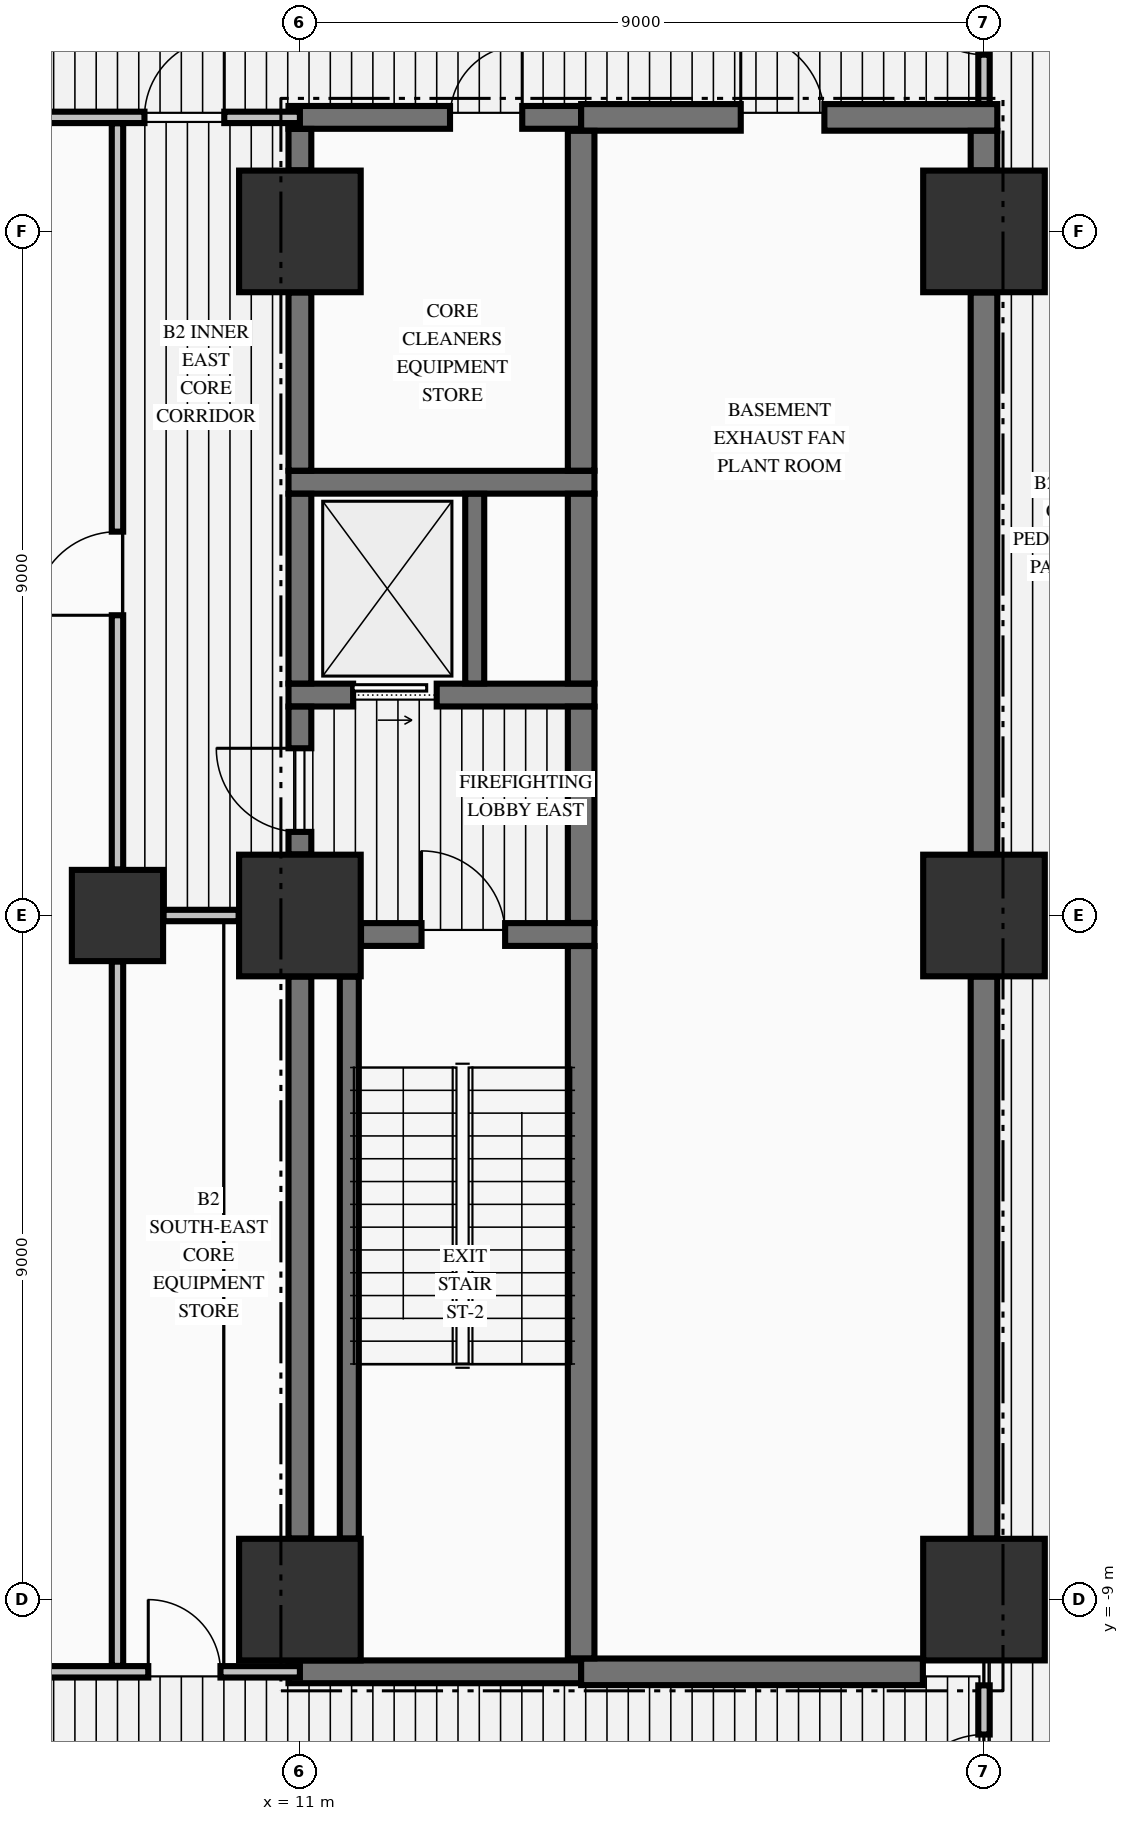
"""IFC4 building model, lengths in metres.
Left out: names, types, materials, properties, quantities, classifications, styles, units other than length and angle.
Written with IfcOpenShell. Run it as: python <this file> out.ifc"""

import sys

from ifc_helpers import new_model, si_unit, direction, frame, frame_2d, origin, origin_2d, place, context, subcontext, project, spatial, rectangle, extrude, element, fill, save


model = new_model("IFC4")
c1 = context("Model", 3, precision=1e-05, world=origin(), true_north=direction((0.0, 1.0)))
c2 = subcontext(c1, "Body", "Model", "MODEL_VIEW")
j1 = project(units=[si_unit("LENGTHUNIT", "METRE"), si_unit("PLANEANGLEUNIT", "RADIAN")], contexts=[c1])
p1 = place(None, origin())
s1 = spatial("IfcSite", under=j1, at=p1, CompositionType="ELEMENT")
p2 = place(p1, origin())
s2 = spatial("IfcBuilding", under=s1, at=p2, CompositionType="ELEMENT")
p3 = place(p2, frame((0.0, 0.0, -9.1)))
s3 = spatial("IfcBuildingStorey", under=s2, at=p3, CompositionType="ELEMENT", Elevation=-9.1)
for number, where, z_axis, x_axis in (
    (1, (11.0, -9.0, -0.45), (0.0, 0.0, 1.0), (1.0, 0.0, 0.0)),
    (2, (11.0, 0.0, -0.45), (0.0, 0.0, 1.0), (1.0, 0.0, 0.0)),
    (3, (11.0, 9.0, -0.45), (0.0, 0.0, 1.0), (1.0, 0.0, 0.0)),
    (4, (20.0, -9.0, -0.45), (0.0, 0.0, 1.0), (1.0, 0.0, 0.0)),
    (5, (20.0, 0.0, -0.45), (0.0, 0.0, 1.0), (1.0, 0.0, 0.0)),
    (6, (20.0, 9.0, -0.45), (0.0, 0.0, 1.0), (1.0, 0.0, 0.0)),
):
    element("IfcColumn", number, at=place(p3, frame(where, z_axis=z_axis, x_axis=x_axis)), inside=s3, PredefinedType="COLUMN", context=c2, shape_type="SweptSolid", body=[
        extrude(rectangle(XDim=1.6, YDim=1.6, at=origin_2d()), origin(), (0.0, 0.0, 1.0), 4.65),
    ])
p4 = place(p3, frame((8.6, 0.0, -0.45), z_axis=(0.0, 0.0, 1.0), x_axis=(1.0, 0.0, 0.0)))
e7 = element("IfcColumn", 7, at=p4, inside=s3, PredefinedType="COLUMN", context=c2, shape_type="SweptSolid", body=[
    extrude(rectangle(XDim=1.2, YDim=1.2, at=origin_2d()), origin(), (0.0, 0.0, 1.0), 4.65),
])
p5 = place(p3, frame((10.85, -9.95, 0.0), z_axis=(0.0, 0.0, 1.0), x_axis=(1.0, 0.0, 0.0)))
e8 = element("IfcWall", 8, at=p5, inside=s3, PredefinedType="SHEAR", context=c2, shape_type="SweptSolid", body=[
    extrude(rectangle(XDim=3.85, YDim=0.3, at=frame_2d((1.925, 0.0))), origin(), (0.0, 0.0, 1.0), 4.2),
])
p6 = place(p3, frame((14.7, -9.95, 0.0), z_axis=(0.0, 0.0, 1.0), x_axis=(1.0, 0.0, 0.0)))
e9 = element("IfcWall", 9, at=p6, inside=s3, PredefinedType="SHEAR", context=c2, shape_type="SweptSolid", body=[
    extrude(rectangle(XDim=4.496, YDim=0.35, at=frame_2d((2.248, 0.0))), origin(), (0.0, 0.0, 1.0), 4.2),
])
p7 = place(p3, frame((11.804, -0.25, 0.0), z_axis=(0.0, 0.0, 1.0), x_axis=(1.0, 0.0, 0.0)))
e10 = element("IfcWall", 10, at=p7, inside=s3, PredefinedType="SHEAR", context=c2, shape_type="SweptSolid", body=[
    extrude(rectangle(XDim=3.071, YDim=0.3, at=frame_2d((1.536, 0.0))), origin(), (0.0, 0.0, 1.0), 4.2),
])
p8 = place(p7, frame((0.796, 0.0, 0.0)))
e11 = element("IfcOpeningElement", 11, at=p8, cuts=e10, PredefinedType="OPENING", context=c2, shape_type="SweptSolid", body=[
    extrude(rectangle(XDim=1.1, YDim=2.15, at=frame_2d((0.55, 1.075))), frame((0.0, 0.16, 0.0), z_axis=(0.0, -1.0, 0.0), x_axis=(1.0, 0.0, 0.0)), (0.0, 0.0, 1.0), 0.32),
])
p9 = place(p3, frame((10.85, 2.9, 0.0), z_axis=(0.0, 0.0, 1.0), x_axis=(1.0, 0.0, 0.0)))
e12 = element("IfcWall", 12, at=p9, inside=s3, PredefinedType="SHEAR", context=c2, shape_type="SweptSolid", body=[
    extrude(rectangle(XDim=4.025, YDim=0.3, at=frame_2d((2.012, 0.0))), origin(), (0.0, 0.0, 1.0), 4.2),
])
p10 = place(p9, frame((0.85, 0.0, 0.0)))
e13 = element("IfcOpeningElement", 13, at=p10, cuts=e12, PredefinedType="OPENING", context=c2, shape_type="SweptSolid", body=[
    extrude(rectangle(XDim=1.1, YDim=2.2, at=frame_2d((0.55, 1.1))), frame((0.0, 0.16, 0.0), z_axis=(0.0, -1.0, 0.0), x_axis=(1.0, 0.0, 0.0)), (0.0, 0.0, 1.0), 0.32),
])
p11 = place(p3, frame((10.85, 5.7, 0.0), z_axis=(0.0, 0.0, 1.0), x_axis=(1.0, 0.0, 0.0)))
e14 = element("IfcWall", 14, at=p11, inside=s3, PredefinedType="SHEAR", context=c2, shape_type="SweptSolid", body=[
    extrude(rectangle(XDim=4.025, YDim=0.3, at=frame_2d((2.012, 0.0))), origin(), (0.0, 0.0, 1.0), 4.2),
])
p12 = place(p3, frame((10.85, 10.5, 0.0), z_axis=(0.0, 0.0, 1.0), x_axis=(1.0, 0.0, 0.0)))
e15 = element("IfcWall", 15, at=p12, inside=s3, PredefinedType="SHEAR", context=c2, shape_type="SweptSolid", body=[
    extrude(rectangle(XDim=3.85, YDim=0.3, at=frame_2d((1.925, 0.0))), origin(), (0.0, 0.0, 1.0), 4.2),
])
p13 = place(p12, frame((2.125, 0.0, 0.0)))
e16 = element("IfcOpeningElement", 16, at=p13, cuts=e15, PredefinedType="OPENING", context=c2, shape_type="SweptSolid", body=[
    extrude(rectangle(XDim=0.95, YDim=2.15, at=frame_2d((0.475, 1.075))), frame((0.0, 0.16, 0.0), z_axis=(0.0, -1.0, 0.0), x_axis=(1.0, 0.0, 0.0)), (0.0, 0.0, 1.0), 0.32),
])
p14 = place(p3, frame((14.7, 10.5, 0.0), z_axis=(0.0, 0.0, 1.0), x_axis=(1.0, 0.0, 0.0)))
e17 = element("IfcWall", 17, at=p14, inside=s3, PredefinedType="SHEAR", context=c2, shape_type="SweptSolid", body=[
    extrude(rectangle(XDim=5.475, YDim=0.35, at=frame_2d((2.738, 0.0))), origin(), (0.0, 0.0, 1.0), 4.2),
])
p15 = place(p14, frame((2.1, 0.0, 0.0)))
e18 = element("IfcOpeningElement", 18, at=p15, cuts=e17, PredefinedType="OPENING", context=c2, shape_type="SweptSolid", body=[
    extrude(rectangle(XDim=1.1, YDim=2.15, at=frame_2d((0.55, 1.075))), frame((0.0, 0.185, 0.0), z_axis=(0.0, -1.0, 0.0), x_axis=(1.0, 0.0, 0.0)), (0.0, 0.0, 1.0), 0.37),
])
p16 = place(p3, frame((-11.0, -9.95, 0.0), z_axis=(0.0, 0.0, 1.0), x_axis=(1.0, 0.0, 0.0)))
e19 = element("IfcWall", 19, at=p16, inside=s3, PredefinedType="PARTITIONING", context=c2, shape_type="SweptSolid", body=[
    extrude(rectangle(XDim=22.0, YDim=0.15, at=frame_2d((11.0, 0.0))), origin(), (0.0, 0.0, 1.0), 4.2),
])
p17 = place(p16, frame((1.045, 0.0, 0.0)))
e20 = element("IfcOpeningElement", 20, at=p17, cuts=e19, PredefinedType="OPENING", context=c2, shape_type="SweptSolid", body=[
    extrude(rectangle(XDim=0.95, YDim=2.15, at=frame_2d((0.475, 1.075))), frame((0.0, 0.085, 0.0), z_axis=(0.0, -1.0, 0.0), x_axis=(1.0, 0.0, 0.0)), (0.0, 0.0, 1.0), 0.17),
])
p18 = place(p16, frame((20.005, 0.0, 0.0)))
e21 = element("IfcOpeningElement", 21, at=p18, cuts=e19, PredefinedType="OPENING", context=c2, shape_type="SweptSolid", body=[
    extrude(rectangle(XDim=0.95, YDim=2.15, at=frame_2d((0.475, 1.075))), frame((0.0, 0.085, 0.0), z_axis=(0.0, -1.0, 0.0), x_axis=(1.0, 0.0, 0.0)), (0.0, 0.0, 1.0), 0.17),
])
p19 = place(p3, frame((9.206, 0.0, 0.0), z_axis=(0.0, 0.0, 1.0), x_axis=(1.0, 0.0, 0.0)))
e22 = element("IfcWall", 22, at=p19, inside=s3, PredefinedType="PARTITIONING", context=c2, shape_type="SweptSolid", body=[
    extrude(rectangle(XDim=0.988, YDim=0.15, at=frame_2d((0.494, 0.0))), origin(), (0.0, 0.0, 1.0), 3.242),
])
p20 = place(p3, frame((-11.0, 10.5, 0.0), z_axis=(0.0, 0.0, 1.0), x_axis=(1.0, 0.0, 0.0)))
e23 = element("IfcWall", 23, at=p20, inside=s3, PredefinedType="PARTITIONING", context=c2, shape_type="SweptSolid", body=[
    extrude(rectangle(XDim=22.0, YDim=0.15, at=frame_2d((11.0, 0.0))), origin(), (0.0, 0.0, 1.0), 4.2),
])
p21 = place(p20, frame((0.995, 0.0, 0.0)))
e24 = element("IfcOpeningElement", 24, at=p21, cuts=e23, PredefinedType="OPENING", context=c2, shape_type="SweptSolid", body=[
    extrude(rectangle(XDim=1.05, YDim=2.15, at=frame_2d((0.525, 1.075))), frame((0.0, 0.085, 0.0), z_axis=(0.0, -1.0, 0.0), x_axis=(1.0, 0.0, 0.0)), (0.0, 0.0, 1.0), 0.17),
])
p22 = place(p20, frame((19.955, 0.0, 0.0)))
e25 = element("IfcOpeningElement", 25, at=p22, cuts=e23, PredefinedType="OPENING", context=c2, shape_type="SweptSolid", body=[
    extrude(rectangle(XDim=1.05, YDim=2.15, at=frame_2d((0.525, 1.075))), frame((0.0, 0.085, 0.0), z_axis=(0.0, -1.0, 0.0), x_axis=(1.0, 0.0, 0.0)), (0.0, 0.0, 1.0), 0.17),
])
p23 = place(p3, frame((11.0, -8.196, 0.0), z_axis=(0.0, 0.0, 1.0), x_axis=(0.0, 1.0, 0.0)))
e26 = element("IfcWall", 26, at=p23, inside=s3, PredefinedType="SHEAR", context=c2, shape_type="SweptSolid", body=[
    extrude(rectangle(XDim=7.392, YDim=0.3, at=frame_2d((3.696, 0.0))), origin(), (0.0, 0.0, 1.0), 4.2),
])
p24 = place(p3, frame((11.0, 0.804, 0.0), z_axis=(0.0, 0.0, 1.0), x_axis=(0.0, 1.0, 0.0)))
e27 = element("IfcWall", 27, at=p24, inside=s3, PredefinedType="SHEAR", context=c2, shape_type="SweptSolid", body=[
    extrude(rectangle(XDim=1.944, YDim=0.3, at=frame_2d((0.972, 0.0))), origin(), (0.0, 0.0, 1.0), 4.2),
])
p25 = place(p24, frame((0.296, 0.0, 0.0)))
e28 = element("IfcOpeningElement", 28, at=p25, cuts=e27, PredefinedType="OPENING", context=c2, shape_type="SweptSolid", body=[
    extrude(rectangle(XDim=1.1, YDim=2.15, at=frame_2d((0.55, 1.075))), frame((0.0, 0.16, 0.0), z_axis=(0.0, -1.0, 0.0), x_axis=(1.0, 0.0, 0.0)), (0.0, 0.0, 1.0), 0.32),
])
p26 = place(p3, frame((11.0, 3.052, 0.0), z_axis=(0.0, 0.0, 1.0), x_axis=(0.0, 1.0, 0.0)))
e29 = element("IfcWall", 29, at=p26, inside=s3, PredefinedType="SHEAR", context=c2, shape_type="SweptSolid", body=[
    extrude(rectangle(XDim=2.496, YDim=0.3, at=frame_2d((1.248, 0.0))), origin(), (0.0, 0.0, 1.0), 4.2),
])
p27 = place(p3, frame((11.0, 5.852, 0.0), z_axis=(0.0, 0.0, 1.0), x_axis=(0.0, 1.0, 0.0)))
e30 = element("IfcWall", 30, at=p27, inside=s3, PredefinedType="SHEAR", context=c2, shape_type="SweptSolid", body=[
    extrude(rectangle(XDim=2.344, YDim=0.3, at=frame_2d((1.172, 0.0))), origin(), (0.0, 0.0, 1.0), 4.2),
])
p28 = place(p3, frame((11.0, 9.804, 0.0), z_axis=(0.0, 0.0, 1.0), x_axis=(0.0, 1.0, 0.0)))
e31 = element("IfcWall", 31, at=p28, inside=s3, PredefinedType="SHEAR", context=c2, shape_type="SweptSolid", body=[
    extrude(rectangle(XDim=0.544, YDim=0.3, at=frame_2d((0.272, 0.0))), origin(), (0.0, 0.0, 1.0), 4.2),
])
p29 = place(p3, frame((11.65, -8.196, 0.0), z_axis=(0.0, 0.0, 1.0), x_axis=(0.0, 1.0, 0.0)))
e32 = element("IfcWall", 32, at=p29, inside=s3, PredefinedType="SOLIDWALL", context=c2, shape_type="SweptSolid", body=[
    extrude(rectangle(XDim=7.392, YDim=0.25, at=frame_2d((3.696, 0.0))), origin(), (0.0, 0.0, 1.0), 4.2),
])
p30 = place(p3, frame((13.3, 3.052, 0.0), z_axis=(0.0, 0.0, 1.0), x_axis=(0.0, 1.0, 0.0)))
e33 = element("IfcWall", 33, at=p30, inside=s3, PredefinedType="SOLIDWALL", context=c2, shape_type="SweptSolid", body=[
    extrude(rectangle(XDim=2.496, YDim=0.25, at=frame_2d((1.248, 0.0))), origin(), (0.0, 0.0, 1.0), 4.2),
])
p31 = place(p3, frame((14.7, -9.773, 0.0), z_axis=(0.0, 0.0, 1.0), x_axis=(0.0, 1.0, 0.0)))
e34 = element("IfcWall", 34, at=p31, inside=s3, PredefinedType="SHEAR", context=c2, shape_type="SweptSolid", body=[
    extrude(rectangle(XDim=9.371, YDim=0.35, at=frame_2d((4.686, 0.0))), origin(), (0.0, 0.0, 1.0), 4.2),
])
p32 = place(p3, frame((14.7, -0.098, 0.0), z_axis=(0.0, 0.0, 1.0), x_axis=(0.0, 1.0, 0.0)))
e35 = element("IfcWall", 35, at=p32, inside=s3, PredefinedType="SHEAR", context=c2, shape_type="SweptSolid", body=[
    extrude(rectangle(XDim=2.846, YDim=0.35, at=frame_2d((1.423, 0.0))), origin(), (0.0, 0.0, 1.0), 4.2),
])
p33 = place(p3, frame((14.7, 3.052, 0.0), z_axis=(0.0, 0.0, 1.0), x_axis=(0.0, 1.0, 0.0)))
e36 = element("IfcWall", 36, at=p33, inside=s3, PredefinedType="SHEAR", context=c2, shape_type="SweptSolid", body=[
    extrude(rectangle(XDim=2.496, YDim=0.35, at=frame_2d((1.248, 0.0))), origin(), (0.0, 0.0, 1.0), 4.2),
])
p34 = place(p3, frame((14.7, 5.852, 0.0), z_axis=(0.0, 0.0, 1.0), x_axis=(0.0, 1.0, 0.0)))
e37 = element("IfcWall", 37, at=p34, inside=s3, PredefinedType="SHEAR", context=c2, shape_type="SweptSolid", body=[
    extrude(rectangle(XDim=4.471, YDim=0.35, at=frame_2d((2.235, 0.0))), origin(), (0.0, 0.0, 1.0), 4.2),
])
for number, where, z_axis, x_axis in (
    (38, (20.0, -8.196, 0.0), (0.0, 0.0, 1.0), (0.0, 1.0, 0.0)),
    (39, (20.0, 0.804, 0.0), (0.0, 0.0, 1.0), (0.0, 1.0, 0.0)),
):
    element("IfcWall", number, at=place(p3, frame(where, z_axis=z_axis, x_axis=x_axis)), inside=s3, PredefinedType="SHEAR", context=c2, shape_type="SweptSolid", body=[
        extrude(rectangle(XDim=7.392, YDim=0.35, at=frame_2d((3.696, 0.0))), origin(), (0.0, 0.0, 1.0), 4.2),
    ])
p35 = place(p3, frame((20.0, 9.804, 0.0), z_axis=(0.0, 0.0, 1.0), x_axis=(0.0, 1.0, 0.0)))
e40 = element("IfcWall", 40, at=p35, inside=s3, PredefinedType="SHEAR", context=c2, shape_type="SweptSolid", body=[
    extrude(rectangle(XDim=0.519, YDim=0.35, at=frame_2d((0.26, 0.0))), origin(), (0.0, 0.0, 1.0), 4.2),
])
p36 = place(p3, frame((8.6, -9.872, 0.0), z_axis=(0.0, 0.0, 1.0), x_axis=(0.0, 1.0, 0.0)))
e41 = element("IfcWall", 41, at=p36, inside=s3, PredefinedType="PARTITIONING", context=c2, shape_type="SweptSolid", body=[
    extrude(rectangle(XDim=9.266, YDim=0.15, at=frame_2d((4.633, 0.0))), origin(), (0.0, 0.0, 1.0), 4.2),
])
p37 = place(p3, frame((8.6, 0.606, 0.0), z_axis=(0.0, 0.0, 1.0), x_axis=(0.0, 1.0, 0.0)))
e42 = element("IfcWall", 42, at=p37, inside=s3, PredefinedType="PARTITIONING", context=c2, shape_type="SweptSolid", body=[
    extrude(rectangle(XDim=9.816, YDim=0.15, at=frame_2d((4.908, 0.0))), origin(), (0.0, 0.0, 1.0), 3.242),
])
p38 = place(p37, frame((3.344, 0.0, 0.0)))
e43 = element("IfcOpeningElement", 43, at=p38, cuts=e42, PredefinedType="OPENING", context=c2, shape_type="SweptSolid", body=[
    extrude(rectangle(XDim=1.1, YDim=2.15, at=frame_2d((0.55, 1.075))), frame((0.0, 0.085, 0.0), z_axis=(0.0, -1.0, 0.0), x_axis=(1.0, 0.0, 0.0)), (0.0, 0.0, 1.0), 0.17),
])
p39 = place(p3, frame((20.0, -12.522, 0.0), z_axis=(0.0, 0.0, 1.0), x_axis=(0.0, 1.0, 0.0)))
e44 = element("IfcWall", 44, at=p39, inside=s3, PredefinedType="PARTITIONING", context=c2, shape_type="SweptSolid", body=[
    extrude(rectangle(XDim=2.394, YDim=0.15, at=frame_2d((1.197, 0.0))), origin(), (0.0, 0.0, 1.0), 3.242),
])
p40 = place(p39, frame((0.697, 0.0, 0.0)))
e45 = element("IfcOpeningElement", 45, at=p40, cuts=e44, PredefinedType="OPENING", context=c2, shape_type="SweptSolid", body=[
    extrude(rectangle(XDim=1.05, YDim=2.15, at=frame_2d((0.525, 1.075))), frame((0.0, 0.085, 0.0), z_axis=(0.0, -1.0, 0.0), x_axis=(1.0, 0.0, 0.0)), (0.0, 0.0, 1.0), 0.17),
])
p41 = place(p3, frame((20.0, 10.678, 0.0), z_axis=(0.0, 0.0, 1.0), x_axis=(0.0, 1.0, 0.0)))
e46 = element("IfcWall", 46, at=p41, inside=s3, PredefinedType="PARTITIONING", context=c2, shape_type="SweptSolid", body=[
    extrude(rectangle(XDim=2.444, YDim=0.15, at=frame_2d((1.222, 0.0))), origin(), (0.0, 0.0, 1.0), 3.242),
])
p42 = place(p41, frame((0.647, 0.0, 0.0)))
e47 = element("IfcOpeningElement", 47, at=p42, cuts=e46, PredefinedType="OPENING", context=c2, shape_type="SweptSolid", body=[
    extrude(rectangle(XDim=1.05, YDim=2.15, at=frame_2d((0.525, 1.075))), frame((0.0, 0.085, 0.0), z_axis=(0.0, -1.0, 0.0), x_axis=(1.0, 0.0, 0.0)), (0.0, 0.0, 1.0), 0.17),
])
p43 = place(p8, origin())
e48 = element("IfcDoor", 48, at=p43, inside=s3, OperationType="SINGLE_SWING_LEFT", PredefinedType="DOOR", context=c2, shape_type="SweptSolid", body=[
    extrude(rectangle(XDim=1.1, YDim=2.15, at=frame_2d((0.55, 1.075))), frame((0.0, 0.025, 0.0), z_axis=(0.0, -1.0, 0.0), x_axis=(1.0, 0.0, 0.0)), (0.0, 0.0, 1.0), 0.05),
])
fill(e11, e48)
p44 = place(p25, origin())
e49 = element("IfcDoor", 49, at=p44, inside=s3, OperationType="SINGLE_SWING_RIGHT", PredefinedType="DOOR", context=c2, shape_type="SweptSolid", body=[
    extrude(rectangle(XDim=1.1, YDim=2.15, at=frame_2d((0.55, 1.075))), frame((0.0, 0.025, 0.0), z_axis=(0.0, -1.0, 0.0), x_axis=(1.0, 0.0, 0.0)), (0.0, 0.0, 1.0), 0.05),
])
fill(e28, e49)
p45 = place(p10, origin())
e50 = element("IfcDoor", 50, at=p45, inside=s3, OperationType="SLIDING_TO_RIGHT", PredefinedType="DOOR", context=c2, shape_type="SweptSolid", body=[
    extrude(rectangle(XDim=1.1, YDim=2.2, at=frame_2d((0.55, 1.1))), frame((0.0, 0.025, 0.0), z_axis=(0.0, -1.0, 0.0), x_axis=(1.0, 0.0, 0.0)), (0.0, 0.0, 1.0), 0.05),
])
fill(e13, e50)
p46 = place(p13, origin())
e51 = element("IfcDoor", 51, at=p46, inside=s3, OperationType="SINGLE_SWING_RIGHT", PredefinedType="DOOR", context=c2, shape_type="SweptSolid", body=[
    extrude(rectangle(XDim=0.95, YDim=2.15, at=frame_2d((0.475, 1.075))), frame((0.0, 0.025, 0.0), z_axis=(0.0, -1.0, 0.0), x_axis=(1.0, 0.0, 0.0)), (0.0, 0.0, 1.0), 0.05),
])
fill(e16, e51)
p47 = place(p15, origin())
e52 = element("IfcDoor", 52, at=p47, inside=s3, OperationType="SINGLE_SWING_LEFT", PredefinedType="DOOR", context=c2, shape_type="SweptSolid", body=[
    extrude(rectangle(XDim=1.1, YDim=2.15, at=frame_2d((0.55, 1.075))), frame((0.0, 0.025, 0.0), z_axis=(0.0, -1.0, 0.0), x_axis=(1.0, 0.0, 0.0)), (0.0, 0.0, 1.0), 0.05),
])
fill(e18, e52)
p48 = place(p22, origin())
e53 = element("IfcDoor", 53, at=p48, inside=s3, OperationType="SINGLE_SWING_RIGHT", PredefinedType="DOOR", context=c2, shape_type="SweptSolid", body=[
    extrude(rectangle(XDim=1.05, YDim=2.15, at=frame_2d((0.525, 1.075))), frame((0.0, 0.025, 0.0), z_axis=(0.0, -1.0, 0.0), x_axis=(1.0, 0.0, 0.0)), (0.0, 0.0, 1.0), 0.05),
])
fill(e25, e53)
p49 = place(p18, origin())
e54 = element("IfcDoor", 54, at=p49, inside=s3, OperationType="SINGLE_SWING_LEFT", PredefinedType="DOOR", context=c2, shape_type="SweptSolid", body=[
    extrude(rectangle(XDim=0.95, YDim=2.15, at=frame_2d((0.475, 1.075))), frame((0.0, 0.025, 0.0), z_axis=(0.0, -1.0, 0.0), x_axis=(1.0, 0.0, 0.0)), (0.0, 0.0, 1.0), 0.05),
])
fill(e21, e54)
p50 = place(p42, origin())
e55 = element("IfcDoor", 55, at=p50, inside=s3, OperationType="SINGLE_SWING_RIGHT", PredefinedType="DOOR", context=c2, shape_type="SweptSolid", body=[
    extrude(rectangle(XDim=1.05, YDim=2.15, at=frame_2d((0.525, 1.075))), frame((0.0, 0.025, 0.0), z_axis=(0.0, -1.0, 0.0), x_axis=(1.0, 0.0, 0.0)), (0.0, 0.0, 1.0), 0.05),
])
fill(e47, e55)
p51 = place(p40, origin())
e56 = element("IfcDoor", 56, at=p51, inside=s3, OperationType="SINGLE_SWING_LEFT", PredefinedType="DOOR", context=c2, shape_type="SweptSolid", body=[
    extrude(rectangle(XDim=1.05, YDim=2.15, at=frame_2d((0.525, 1.075))), frame((0.0, 0.025, 0.0), z_axis=(0.0, -1.0, 0.0), x_axis=(1.0, 0.0, 0.0)), (0.0, 0.0, 1.0), 0.05),
])
fill(e45, e56)
p52 = place(p38, origin())
e57 = element("IfcDoor", 57, at=p52, inside=s3, OperationType="SINGLE_SWING_LEFT", PredefinedType="DOOR", context=c2, shape_type="SweptSolid", body=[
    extrude(rectangle(XDim=1.1, YDim=2.15, at=frame_2d((0.55, 1.075))), frame((0.0, 0.025, 0.0), z_axis=(0.0, -1.0, 0.0), x_axis=(1.0, 0.0, 0.0)), (0.0, 0.0, 1.0), 0.05),
])
fill(e43, e57)
save(model, sys.argv[1])
